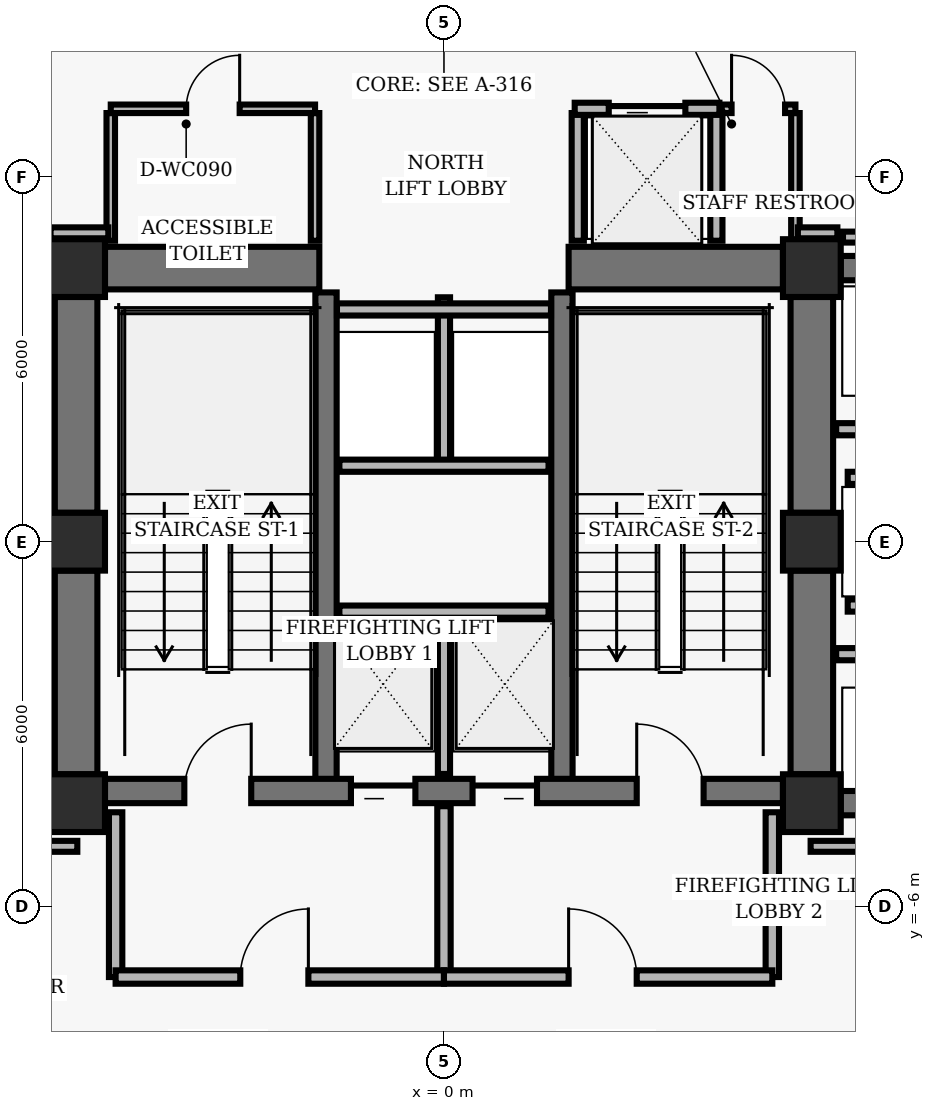
"""IFC4 building model, lengths in metres.
Left out: names, types, materials, properties, quantities, classifications, styles, units other than length and angle.
Written with IfcOpenShell. Run it as: python <this file> out.ifc"""

import sys

from ifc_helpers import new_model, si_unit, direction, frame, frame_2d, origin, origin_2d, place, context, subcontext, project, spatial, rectangle, hollow_rectangle, extrude, element, fill, save


model = new_model("IFC4")
c1 = context("Model", 3, precision=1e-05, world=origin(), true_north=direction((0.0, 1.0)))
c2 = subcontext(c1, "Body", "Model", "MODEL_VIEW")
j1 = project(units=[si_unit("LENGTHUNIT", "METRE"), si_unit("PLANEANGLEUNIT", "RADIAN")], contexts=[c1])
p1 = place(None, origin())
s1 = spatial("IfcSite", under=j1, at=p1, CompositionType="ELEMENT")
p2 = place(p1, origin())
s2 = spatial("IfcBuilding", under=s1, at=p2, CompositionType="ELEMENT")
p3 = place(p2, frame((0.0, 0.0, 63.04)))
s3 = spatial("IfcBuildingStorey", under=s2, at=p3, CompositionType="ELEMENT", Elevation=63.04)
for number, where, z_axis, x_axis in (
    (1, (-6.05, 4.5, 0.0), (0.0, 0.0, 1.0), (1.0, 0.0, 0.0)),
    (2, (6.05, 4.5, 0.0), (0.0, 0.0, 1.0), (1.0, 0.0, 0.0)),
    (3, (-6.05, 0.0, 0.0), (0.0, 0.0, 1.0), (1.0, 0.0, 0.0)),
    (4, (6.05, 0.0, 0.0), (0.0, 0.0, 1.0), (1.0, 0.0, 0.0)),
    (5, (-6.05, -4.3, 0.0), (0.0, 0.0, 1.0), (1.0, 0.0, 0.0)),
    (6, (6.05, -4.3, 0.0), (0.0, 0.0, 1.0), (1.0, 0.0, 0.0)),
):
    element("IfcColumn", number, at=place(p3, frame(where, z_axis=z_axis, x_axis=x_axis)), inside=s3, PredefinedType="COLUMN", context=c2, shape_type="SweptSolid", body=[
        extrude(hollow_rectangle(XDim=0.95, YDim=0.95, WallThickness=0.06, InnerFilletRadius=0.02, OuterFilletRadius=0.04, at=origin_2d()), origin(), (0.0, 0.0, 1.0), 3.36),
    ])
p4 = place(p3, frame((-6.05, 0.475, 0.0), z_axis=(0.0, 0.0, 1.0), x_axis=(0.0, 1.0, 0.0)))
e7 = element("IfcWall", 7, at=p4, inside=s3, PredefinedType="SHEAR", context=c2, shape_type="SweptSolid", body=[
    extrude(rectangle(XDim=3.55, YDim=0.7, at=frame_2d((1.775, 0.0))), origin(), (0.0, 0.0, 1.0), 3.098),
])
p5 = place(p3, frame((-6.05, -3.825, 0.0), z_axis=(0.0, 0.0, 1.0), x_axis=(0.0, 1.0, 0.0)))
e8 = element("IfcWall", 8, at=p5, inside=s3, PredefinedType="SHEAR", context=c2, shape_type="SweptSolid", body=[
    extrude(rectangle(XDim=3.35, YDim=0.7, at=frame_2d((1.675, 0.0))), origin(), (0.0, 0.0, 1.0), 3.098),
])
p6 = place(p3, frame((6.05, 0.475, 0.0), z_axis=(0.0, 0.0, 1.0), x_axis=(0.0, 1.0, 0.0)))
e9 = element("IfcWall", 9, at=p6, inside=s3, PredefinedType="SHEAR", context=c2, shape_type="SweptSolid", body=[
    extrude(rectangle(XDim=3.55, YDim=0.7, at=frame_2d((1.775, 0.0))), origin(), (0.0, 0.0, 1.0), 3.098),
])
p7 = place(p3, frame((6.05, -3.825, 0.0), z_axis=(0.0, 0.0, 1.0), x_axis=(0.0, 1.0, 0.0)))
e10 = element("IfcWall", 10, at=p7, inside=s3, PredefinedType="SHEAR", context=c2, shape_type="SweptSolid", body=[
    extrude(rectangle(XDim=3.35, YDim=0.7, at=frame_2d((1.675, 0.0))), origin(), (0.0, 0.0, 1.0), 3.098),
])
for number, where, z_axis, x_axis in (
    (11, (-1.94, -4.1, 0.0), (0.0, 0.0, 1.0), (0.0, 1.0, 0.0)),
    (12, (1.94, -4.1, 0.0), (0.0, 0.0, 1.0), (0.0, 1.0, 0.0)),
):
    element("IfcWall", number, at=place(p3, frame(where, z_axis=z_axis, x_axis=x_axis)), inside=s3, PredefinedType="SHEAR", context=c2, shape_type="SweptSolid", body=[
        extrude(rectangle(XDim=8.2, YDim=0.35, at=frame_2d((4.1, 0.0))), origin(), (0.0, 0.0, 1.0), 3.098),
    ])
p8 = place(p3, frame((-5.575, -4.1, 0.0), z_axis=(0.0, 0.0, 1.0), x_axis=(1.0, 0.0, 0.0)))
e13 = element("IfcWall", 13, at=p8, inside=s3, PredefinedType="SHEAR", context=c2, shape_type="SweptSolid", body=[
    extrude(rectangle(XDim=11.15, YDim=0.4, at=frame_2d((5.575, 0.0))), origin(), (0.0, 0.0, 1.0), 3.098),
])
p9 = place(p8, frame((1.305, 0.0, 0.0)))
e14 = element("IfcOpeningElement", 14, at=p9, cuts=e13, PredefinedType="OPENING", context=c2, shape_type="SweptSolid", body=[
    extrude(rectangle(XDim=1.1, YDim=2.04, at=frame_2d((0.55, 1.02))), frame((0.0, 0.21, 0.0), z_axis=(0.0, -1.0, 0.0), x_axis=(1.0, 0.0, 0.0)), (0.0, 0.0, 1.0), 0.42),
])
p10 = place(p8, frame((8.745, 0.0, 0.0)))
e15 = element("IfcOpeningElement", 15, at=p10, cuts=e13, PredefinedType="OPENING", context=c2, shape_type="SweptSolid", body=[
    extrude(rectangle(XDim=1.1, YDim=2.04, at=frame_2d((0.55, 1.02))), frame((0.0, 0.21, 0.0), z_axis=(0.0, -1.0, 0.0), x_axis=(1.0, 0.0, 0.0)), (0.0, 0.0, 1.0), 0.42),
])
p11 = place(p8, frame((4.045, 0.0, 0.0)))
e16 = element("IfcOpeningElement", 16, at=p11, cuts=e13, PredefinedType="OPENING", context=c2, shape_type="SweptSolid", body=[
    extrude(rectangle(XDim=1.06, YDim=2.04, at=frame_2d((0.53, 1.02))), frame((0.0, 0.21, 0.0), z_axis=(0.0, -1.0, 0.0), x_axis=(1.0, 0.0, 0.0)), (0.0, 0.0, 1.0), 0.42),
])
p12 = place(p8, frame((6.045, 0.0, 0.0)))
e17 = element("IfcOpeningElement", 17, at=p12, cuts=e13, PredefinedType="OPENING", context=c2, shape_type="SweptSolid", body=[
    extrude(rectangle(XDim=1.06, YDim=2.04, at=frame_2d((0.53, 1.02))), frame((0.0, 0.21, 0.0), z_axis=(0.0, -1.0, 0.0), x_axis=(1.0, 0.0, 0.0)), (0.0, 0.0, 1.0), 0.42),
])
for number, where, z_axis, x_axis in (
    (18, (-5.575, 4.5, 0.0), (0.0, 0.0, 1.0), (1.0, 0.0, 0.0)),
    (19, (2.05, 4.5, 0.0), (0.0, 0.0, 1.0), (1.0, 0.0, 0.0)),
):
    element("IfcWall", number, at=place(p3, frame(where, z_axis=z_axis, x_axis=x_axis)), inside=s3, PredefinedType="SHEAR", context=c2, shape_type="SweptSolid", body=[
        extrude(rectangle(XDim=3.525, YDim=0.7, at=frame_2d((1.762, 0.0))), origin(), (0.0, 0.0, 1.0), 3.098),
    ])
for number, where, z_axis, x_axis in (
    (20, (6.525, 4.5, 0.0), (0.0, 0.0, 1.0), (1.0, 0.0, 0.0)),
    (21, (6.525, -4.3, 0.0), (0.0, 0.0, 1.0), (1.0, 0.0, 0.0)),
):
    element("IfcWall", number, at=place(p3, frame(where, z_axis=z_axis, x_axis=x_axis)), inside=s3, PredefinedType="SHEAR", context=c2, shape_type="SweptSolid", body=[
        extrude(rectangle(XDim=1.95, YDim=0.4, at=frame_2d((0.975, 0.0))), origin(), (0.0, 0.0, 1.0), 3.098),
    ])
p13 = place(p3, frame((0.0, -3.82, 0.0), z_axis=(0.0, 0.0, 1.0), x_axis=(0.0, 1.0, 0.0)))
e22 = element("IfcWall", 22, at=p13, inside=s3, PredefinedType="PARTITIONING", context=c2, shape_type="SweptSolid", body=[
    extrude(rectangle(XDim=2.67, YDim=0.2, at=frame_2d((1.335, 0.0))), origin(), (0.0, 0.0, 1.0), 3.073),
])
p14 = place(p3, frame((-1.72, -1.15, 0.0), z_axis=(0.0, 0.0, 1.0), x_axis=(1.0, 0.0, 0.0)))
e23 = element("IfcWall", 23, at=p14, inside=s3, PredefinedType="PARTITIONING", context=c2, shape_type="SweptSolid", body=[
    extrude(rectangle(XDim=3.44, YDim=0.2, at=frame_2d((1.72, 0.0))), origin(), (0.0, 0.0, 1.0), 3.073),
])
for number, where, z_axis, x_axis in (
    (24, (-5.4, -7.16, 0.0), (0.0, 0.0, 1.0), (0.0, 1.0, 0.0)),
    (25, (5.4, -7.16, 0.0), (0.0, 0.0, 1.0), (0.0, 1.0, 0.0)),
):
    element("IfcWall", number, at=place(p3, frame(where, z_axis=z_axis, x_axis=x_axis)), inside=s3, PredefinedType="PARTITIONING", context=c2, shape_type="SweptSolid", body=[
        extrude(rectangle(XDim=2.71, YDim=0.22, at=frame_2d((1.355, 0.0))), origin(), (0.0, 0.0, 1.0), 3.073),
    ])
p15 = place(p3, frame((0.0, -7.16, 0.0), z_axis=(0.0, 0.0, 1.0), x_axis=(0.0, 1.0, 0.0)))
e26 = element("IfcWall", 26, at=p15, inside=s3, PredefinedType="PARTITIONING", context=c2, shape_type="SweptSolid", body=[
    extrude(rectangle(XDim=2.81, YDim=0.22, at=frame_2d((1.405, 0.0))), origin(), (0.0, 0.0, 1.0), 3.073),
])
p16 = place(p3, frame((-5.4, -7.16, 0.0), z_axis=(0.0, 0.0, 1.0), x_axis=(1.0, 0.0, 0.0)))
e27 = element("IfcWall", 27, at=p16, inside=s3, PredefinedType="PARTITIONING", context=c2, shape_type="SweptSolid", body=[
    extrude(rectangle(XDim=5.4, YDim=0.22, at=frame_2d((2.7, 0.0))), origin(), (0.0, 0.0, 1.0), 2.587),
])
p17 = place(p16, frame((2.05, 0.0, 0.0)))
e28 = element("IfcOpeningElement", 28, at=p17, cuts=e27, PredefinedType="OPENING", context=c2, shape_type="SweptSolid", body=[
    extrude(rectangle(XDim=1.12, YDim=2.02, at=frame_2d((0.56, 1.01))), frame((0.0, 0.12, 0.0), z_axis=(0.0, -1.0, 0.0), x_axis=(1.0, 0.0, 0.0)), (0.0, 0.0, 1.0), 0.24),
])
p18 = place(p3, frame((0.0, -7.16, 0.0), z_axis=(0.0, 0.0, 1.0), x_axis=(1.0, 0.0, 0.0)))
e29 = element("IfcWall", 29, at=p18, inside=s3, PredefinedType="PARTITIONING", context=c2, shape_type="SweptSolid", body=[
    extrude(rectangle(XDim=5.4, YDim=0.22, at=frame_2d((2.7, 0.0))), origin(), (0.0, 0.0, 1.0), 2.587),
])
p19 = place(p18, frame((2.05, 0.0, 0.0)))
e30 = element("IfcOpeningElement", 30, at=p19, cuts=e29, PredefinedType="OPENING", context=c2, shape_type="SweptSolid", body=[
    extrude(rectangle(XDim=1.12, YDim=2.02, at=frame_2d((0.56, 1.01))), frame((0.0, 0.12, 0.0), z_axis=(0.0, -1.0, 0.0), x_axis=(1.0, 0.0, 0.0)), (0.0, 0.0, 1.0), 0.24),
])
p20 = place(p3, frame((0.0, 1.25, 0.0), z_axis=(0.0, 0.0, 1.0), x_axis=(0.0, 1.0, 0.0)))
e31 = element("IfcWall", 31, at=p20, inside=s3, PredefinedType="PARTITIONING", context=c2, shape_type="SweptSolid", body=[
    extrude(rectangle(XDim=2.77, YDim=0.2, at=frame_2d((1.385, 0.0))), origin(), (0.0, 0.0, 1.0), 3.073),
])
p21 = place(p3, frame((-1.72, 1.25, 0.0), z_axis=(0.0, 0.0, 1.0), x_axis=(1.0, 0.0, 0.0)))
e32 = element("IfcWall", 32, at=p21, inside=s3, PredefinedType="PARTITIONING", context=c2, shape_type="SweptSolid", body=[
    extrude(rectangle(XDim=3.44, YDim=0.2, at=frame_2d((1.72, 0.0))), origin(), (0.0, 0.0, 1.0), 3.073),
])
p22 = place(p3, frame((-1.76, 3.82, 0.0), z_axis=(0.0, 0.0, 1.0), x_axis=(1.0, 0.0, 0.0)))
e33 = element("IfcWall", 33, at=p22, inside=s3, PredefinedType="PARTITIONING", context=c2, shape_type="SweptSolid", body=[
    extrude(rectangle(XDim=3.52, YDim=0.2, at=frame_2d((1.76, 0.0))), origin(), (0.0, 0.0, 1.0), 3.073),
])
for number, where, z_axis, x_axis in (
    (34, (2.2, 4.95, 0.0), (0.0, 0.0, 1.0), (0.0, 1.0, 0.0)),
    (35, (4.48, 4.95, 0.0), (0.0, 0.0, 1.0), (0.0, 1.0, 0.0)),
):
    element("IfcWall", number, at=place(p3, frame(where, z_axis=z_axis, x_axis=x_axis)), inside=s3, PredefinedType="PARTITIONING", context=c2, shape_type="SweptSolid", body=[
        extrude(rectangle(XDim=2.1, YDim=0.2, at=frame_2d((1.05, 0.0))), origin(), (0.0, 0.0, 1.0), 3.073),
    ])
p23 = place(p3, frame((2.15, 7.12, 0.0), z_axis=(0.0, 0.0, 1.0), x_axis=(1.0, 0.0, 0.0)))
e36 = element("IfcWall", 36, at=p23, inside=s3, PredefinedType="PARTITIONING", context=c2, shape_type="SweptSolid", body=[
    extrude(rectangle(XDim=2.38, YDim=0.2, at=frame_2d((1.19, 0.0))), origin(), (0.0, 0.0, 1.0), 2.587),
])
p24 = place(p23, frame((0.56, 0.0, 0.0)))
e37 = element("IfcOpeningElement", 37, at=p24, cuts=e36, PredefinedType="OPENING", context=c2, shape_type="SweptSolid", body=[
    extrude(rectangle(XDim=1.26, YDim=2.06, at=frame_2d((0.63, 1.03))), frame((0.0, 0.11, 0.0), z_axis=(0.0, -1.0, 0.0), x_axis=(1.0, 0.0, 0.0)), (0.0, 0.0, 1.0), 0.22),
])
for number, where, z_axis, x_axis in (
    (38, (-5.48, 4.95, 0.0), (0.0, 0.0, 1.0), (0.0, 1.0, 0.0)),
    (39, (-2.12, 4.95, 0.0), (0.0, 0.0, 1.0), (0.0, 1.0, 0.0)),
):
    element("IfcWall", number, at=place(p3, frame(where, z_axis=z_axis, x_axis=x_axis)), inside=s3, PredefinedType="PARTITIONING", context=c2, shape_type="SweptSolid", body=[
        extrude(rectangle(XDim=2.1, YDim=0.14, at=frame_2d((1.05, 0.0))), origin(), (0.0, 0.0, 1.0), 3.073),
    ])
p25 = place(p3, frame((-5.48, 7.12, 0.0), z_axis=(0.0, 0.0, 1.0), x_axis=(1.0, 0.0, 0.0)))
e40 = element("IfcWall", 40, at=p25, inside=s3, PredefinedType="PARTITIONING", context=c2, shape_type="SweptSolid", body=[
    extrude(rectangle(XDim=3.36, YDim=0.14, at=frame_2d((1.68, 0.0))), origin(), (0.0, 0.0, 1.0), 3.073),
])
p26 = place(p25, frame((1.24, 0.0, 0.0)))
e41 = element("IfcOpeningElement", 41, at=p26, cuts=e40, PredefinedType="OPENING", context=c2, shape_type="SweptSolid", body=[
    extrude(rectangle(XDim=0.88, YDim=2.02, at=frame_2d((0.44, 1.01))), frame((0.0, 0.08, 0.0), z_axis=(0.0, -1.0, 0.0), x_axis=(1.0, 0.0, 0.0)), (0.0, 0.0, 1.0), 0.16),
])
p27 = place(p3, frame((5.78, 4.95, 0.0), z_axis=(0.0, 0.0, 1.0), x_axis=(0.0, 1.0, 0.0)))
e42 = element("IfcWall", 42, at=p27, inside=s3, PredefinedType="PARTITIONING", context=c2, shape_type="SweptSolid", body=[
    extrude(rectangle(XDim=2.1, YDim=0.14, at=frame_2d((1.05, 0.0))), origin(), (0.0, 0.0, 1.0), 3.073),
])
p28 = place(p3, frame((4.56, 7.12, 0.0), z_axis=(0.0, 0.0, 1.0), x_axis=(1.0, 0.0, 0.0)))
e43 = element("IfcWall", 43, at=p28, inside=s3, PredefinedType="PARTITIONING", context=c2, shape_type="SweptSolid", body=[
    extrude(rectangle(XDim=1.22, YDim=0.14, at=frame_2d((0.61, 0.0))), origin(), (0.0, 0.0, 1.0), 2.587),
])
p29 = place(p28, frame((0.17, 0.0, 0.0)))
e44 = element("IfcOpeningElement", 44, at=p29, cuts=e43, PredefinedType="OPENING", context=c2, shape_type="SweptSolid", body=[
    extrude(rectangle(XDim=0.88, YDim=2.02, at=frame_2d((0.44, 1.01))), frame((0.0, 0.08, 0.0), z_axis=(0.0, -1.0, 0.0), x_axis=(1.0, 0.0, 0.0)), (0.0, 0.0, 1.0), 0.16),
])
for number, where, z_axis, x_axis in (
    (45, (6.45, -1.85, 0.0), (0.0, 0.0, 1.0), (1.0, 0.0, 0.0)),
    (46, (6.45, 1.85, 0.0), (0.0, 0.0, 1.0), (1.0, 0.0, 0.0)),
):
    element("IfcWall", number, at=place(p3, frame(where, z_axis=z_axis, x_axis=x_axis)), inside=s3, PredefinedType="PARTITIONING", context=c2, shape_type="SweptSolid", body=[
        extrude(rectangle(XDim=2.1, YDim=0.2, at=frame_2d((1.05, 0.0))), origin(), (0.0, 0.0, 1.0), 3.073),
    ])
for number, where, z_axis, x_axis in (
    (47, (6.64, -1.05, 0.0), (0.0, 0.0, 1.0), (1.0, 0.0, 0.0)),
    (48, (6.64, 1.05, 0.0), (0.0, 0.0, 1.0), (1.0, 0.0, 0.0)),
):
    element("IfcWall", number, at=place(p3, frame(where, z_axis=z_axis, x_axis=x_axis)), inside=s3, PredefinedType="PARTITIONING", context=c2, shape_type="SweptSolid", body=[
        extrude(rectangle(XDim=1.91, YDim=0.2, at=frame_2d((0.955, 0.0))), origin(), (0.0, 0.0, 1.0), 3.073),
    ])
for number, where, z_axis, x_axis in (
    (49, (-9.37, -5.01, 0.0), (0.0, 0.0, 1.0), (1.0, 0.0, 0.0)),
    (50, (6.03, -5.01, 0.0), (0.0, 0.0, 1.0), (1.0, 0.0, 0.0)),
):
    element("IfcWall", number, at=place(p3, frame(where, z_axis=z_axis, x_axis=x_axis)), inside=s3, PredefinedType="PARTITIONING", context=c2, shape_type="SweptSolid", body=[
        extrude(rectangle(XDim=3.34, YDim=0.18, at=frame_2d((1.67, 0.0))), origin(), (0.0, 0.0, 1.0), 3.073),
    ])
p30 = place(p3, frame((9.37, 5.01, 0.0), z_axis=(0.0, 0.0, 1.0), x_axis=(-1.0, 0.0, 0.0)))
e51 = element("IfcWall", 51, at=p30, inside=s3, PredefinedType="PARTITIONING", context=c2, shape_type="SweptSolid", body=[
    extrude(rectangle(XDim=2.808, YDim=0.18, at=frame_2d((1.404, 0.0))), origin(), (0.0, 0.0, 1.0), 3.073),
])
p31 = place(p3, frame((6.47, 5.08, 0.0), z_axis=(0.0, 0.0, 1.0), x_axis=(-1.0, 0.0, 0.0)))
e52 = element("IfcWall", 52, at=p31, inside=s3, PredefinedType="PARTITIONING", context=c2, shape_type="SweptSolid", body=[
    extrude(rectangle(XDim=0.65, YDim=0.18, at=frame_2d((0.325, 0.0))), origin(), (0.0, 0.0, 1.0), 3.073),
])
p32 = place(p3, frame((-5.52, 5.08, 0.0), z_axis=(0.0, 0.0, 1.0), x_axis=(-1.0, 0.0, 0.0)))
e53 = element("IfcWall", 53, at=p32, inside=s3, PredefinedType="PARTITIONING", context=c2, shape_type="SweptSolid", body=[
    extrude(rectangle(XDim=0.95, YDim=0.18, at=frame_2d((0.475, 0.0))), origin(), (0.0, 0.0, 1.0), 3.073),
])
p33 = place(p9, origin())
e54 = element("IfcDoor", 54, at=p33, inside=s3, OperationType="SINGLE_SWING_RIGHT", PredefinedType="DOOR", context=c2, shape_type="SweptSolid", body=[
    extrude(rectangle(XDim=1.1, YDim=2.04, at=frame_2d((0.55, 1.02))), frame((0.0, 0.025, 0.0), z_axis=(0.0, -1.0, 0.0), x_axis=(1.0, 0.0, 0.0)), (0.0, 0.0, 1.0), 0.05),
])
fill(e14, e54)
p34 = place(p10, origin())
e55 = element("IfcDoor", 55, at=p34, inside=s3, OperationType="SINGLE_SWING_LEFT", PredefinedType="DOOR", context=c2, shape_type="SweptSolid", body=[
    extrude(rectangle(XDim=1.1, YDim=2.04, at=frame_2d((0.55, 1.02))), frame((0.0, 0.025, 0.0), z_axis=(0.0, -1.0, 0.0), x_axis=(1.0, 0.0, 0.0)), (0.0, 0.0, 1.0), 0.05),
])
fill(e15, e55)
p35 = place(p11, origin())
e56 = element("IfcDoor", 56, at=p35, inside=s3, OperationType="SLIDING_TO_LEFT", PredefinedType="DOOR", context=c2, shape_type="SweptSolid", body=[
    extrude(rectangle(XDim=1.06, YDim=2.04, at=frame_2d((0.53, 1.02))), frame((0.0, 0.025, 0.0), z_axis=(0.0, -1.0, 0.0), x_axis=(1.0, 0.0, 0.0)), (0.0, 0.0, 1.0), 0.05),
])
fill(e16, e56)
p36 = place(p12, origin())
e57 = element("IfcDoor", 57, at=p36, inside=s3, OperationType="SLIDING_TO_RIGHT", PredefinedType="DOOR", context=c2, shape_type="SweptSolid", body=[
    extrude(rectangle(XDim=1.06, YDim=2.04, at=frame_2d((0.53, 1.02))), frame((0.0, 0.025, 0.0), z_axis=(0.0, -1.0, 0.0), x_axis=(1.0, 0.0, 0.0)), (0.0, 0.0, 1.0), 0.05),
])
fill(e17, e57)
p37 = place(p17, origin())
e58 = element("IfcDoor", 58, at=p37, inside=s3, OperationType="SINGLE_SWING_RIGHT", PredefinedType="DOOR", context=c2, shape_type="SweptSolid", body=[
    extrude(rectangle(XDim=1.12, YDim=2.02, at=frame_2d((0.56, 1.01))), frame((0.0, 0.025, 0.0), z_axis=(0.0, -1.0, 0.0), x_axis=(1.0, 0.0, 0.0)), (0.0, 0.0, 1.0), 0.05),
])
fill(e28, e58)
p38 = place(p19, origin())
e59 = element("IfcDoor", 59, at=p38, inside=s3, OperationType="SINGLE_SWING_LEFT", PredefinedType="DOOR", context=c2, shape_type="SweptSolid", body=[
    extrude(rectangle(XDim=1.12, YDim=2.02, at=frame_2d((0.56, 1.01))), frame((0.0, 0.025, 0.0), z_axis=(0.0, -1.0, 0.0), x_axis=(1.0, 0.0, 0.0)), (0.0, 0.0, 1.0), 0.05),
])
fill(e30, e59)
p39 = place(p24, origin())
e60 = element("IfcDoor", 60, at=p39, inside=s3, OperationType="SLIDING_TO_LEFT", PredefinedType="DOOR", context=c2, shape_type="SweptSolid", body=[
    extrude(rectangle(XDim=1.26, YDim=2.06, at=frame_2d((0.63, 1.03))), frame((0.0, 0.025, 0.0), z_axis=(0.0, -1.0, 0.0), x_axis=(1.0, 0.0, 0.0)), (0.0, 0.0, 1.0), 0.05),
])
fill(e37, e60)
p40 = place(p26, origin())
e61 = element("IfcDoor", 61, at=p40, inside=s3, OperationType="SINGLE_SWING_RIGHT", PredefinedType="DOOR", context=c2, shape_type="SweptSolid", body=[
    extrude(rectangle(XDim=0.88, YDim=2.02, at=frame_2d((0.44, 1.01))), frame((0.0, 0.025, 0.0), z_axis=(0.0, -1.0, 0.0), x_axis=(1.0, 0.0, 0.0)), (0.0, 0.0, 1.0), 0.05),
])
fill(e41, e61)
p41 = place(p29, origin())
e62 = element("IfcDoor", 62, at=p41, inside=s3, OperationType="SINGLE_SWING_LEFT", PredefinedType="DOOR", context=c2, shape_type="SweptSolid", body=[
    extrude(rectangle(XDim=0.88, YDim=2.02, at=frame_2d((0.44, 1.01))), frame((0.0, 0.025, 0.0), z_axis=(0.0, -1.0, 0.0), x_axis=(1.0, 0.0, 0.0)), (0.0, 0.0, 1.0), 0.05),
])
fill(e44, e62)
save(model, sys.argv[1])
